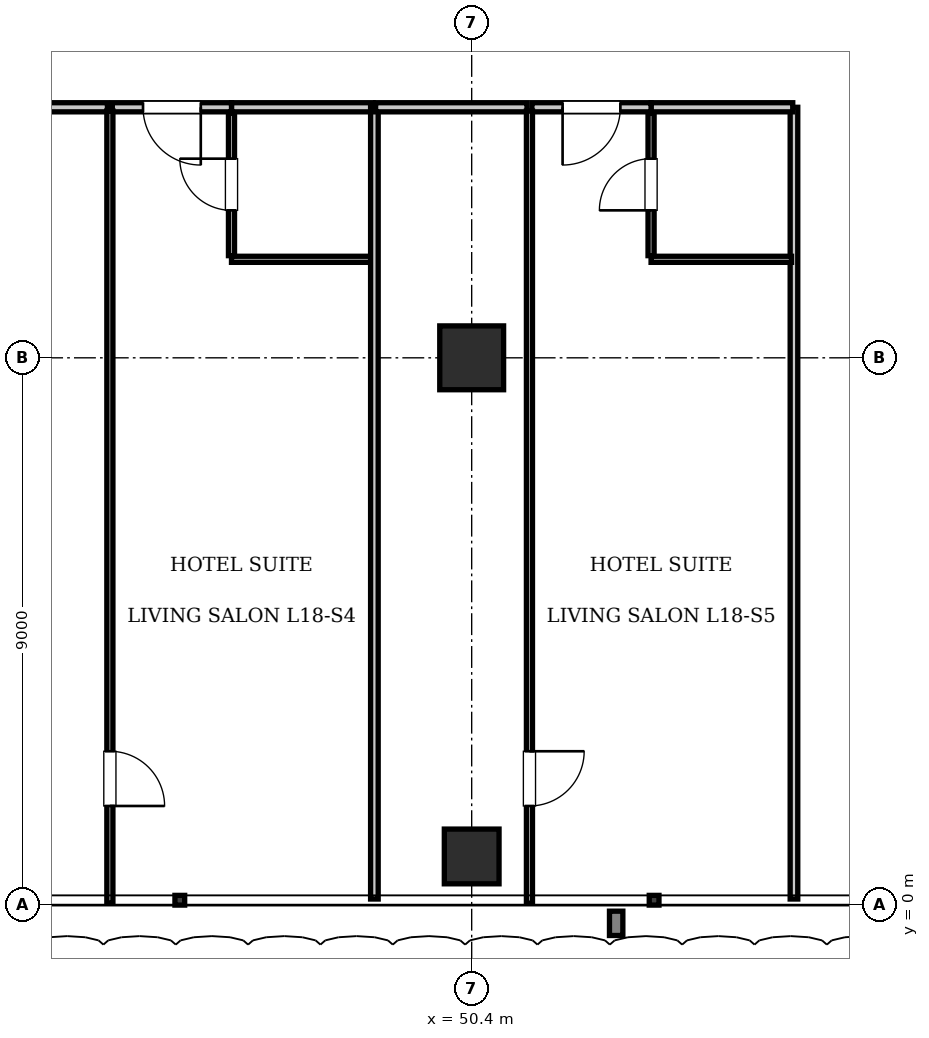
"""IFC4 building model, lengths in metres.
Left out: names, types, materials, properties, quantities, classifications, styles, units other than length and angle.
Written with IfcOpenShell. Run it as: python <this file> out.ifc"""

import sys

from ifc_helpers import new_model, si_unit, direction, frame, frame_2d, origin, origin_2d, place, context, subcontext, project, spatial, rectangle, extrude, element, fill, save


model = new_model("IFC4")
c1 = context("Model", 3, precision=1e-05, world=origin(), true_north=direction((0.0, 1.0)))
c2 = subcontext(c1, "Body", "Model", "MODEL_VIEW")
j1 = project(units=[si_unit("LENGTHUNIT", "METRE"), si_unit("PLANEANGLEUNIT", "RADIAN")], contexts=[c1])
p1 = place(None, origin())
s1 = spatial("IfcSite", under=j1, at=p1, CompositionType="ELEMENT")
p2 = place(p1, origin())
s2 = spatial("IfcBuilding", under=s1, at=p2, CompositionType="ELEMENT")
p3 = place(p2, frame((0.0, 0.0, 77.0)))
s3 = spatial("IfcBuildingStorey", under=s2, at=p3, CompositionType="ELEMENT", Elevation=77.0)
p4 = place(p3, frame((50.4, 9.0, 0.0), z_axis=(0.0, 0.0, 1.0), x_axis=(1.0, 0.0, 0.0)))
e1 = element("IfcColumn", 1, at=p4, inside=s3, PredefinedType="COLUMN", context=c2, shape_type="SweptSolid", body=[
    extrude(rectangle(XDim=1.05, YDim=1.05, at=origin_2d()), origin(), (0.0, 0.0, 1.0), 3.85),
])
p5 = place(p3, frame((50.4, 0.8, 0.0), z_axis=(0.0, 0.0, 1.0), x_axis=(1.0, 0.0, 0.0)))
e2 = element("IfcColumn", 2, at=p5, inside=s3, PredefinedType="COLUMN", context=c2, shape_type="SweptSolid", body=[
    extrude(rectangle(XDim=0.9, YDim=0.9, at=origin_2d()), origin(), (0.0, 0.0, 1.0), 3.85),
])
p6 = place(p3, frame((55.7, 0.1, 0.0), z_axis=(0.0, 0.0, 1.0), x_axis=(0.0, 1.0, 0.0)))
e3 = element("IfcWall", 3, at=p6, inside=s3, PredefinedType="PARTITIONING", context=c2, shape_type="SweptSolid", body=[
    extrude(rectangle(XDim=13.02, YDim=0.125, at=frame_2d((6.51, 0.0))), origin(), (0.0, 0.0, 1.0), 3.61),
])
p7 = place(p3, frame((46.45, 13.12, 0.0), z_axis=(0.0, 0.0, 1.0), x_axis=(1.0, 0.0, 0.0)))
e4 = element("IfcWall", 4, at=p7, inside=s3, PredefinedType="PARTITIONING", context=c2, shape_type="SweptSolid", body=[
    extrude(rectangle(XDim=2.33, YDim=0.15, at=frame_2d((1.165, 0.0))), origin(), (0.0, 0.0, 1.0), 3.61),
])
p8 = place(p3, frame((46.45, 10.62, 0.0), z_axis=(0.0, 0.0, 1.0), x_axis=(1.0, 0.0, 0.0)))
e5 = element("IfcWall", 5, at=p8, inside=s3, PredefinedType="PARTITIONING", context=c2, shape_type="SweptSolid", body=[
    extrude(rectangle(XDim=2.31, YDim=0.1, at=frame_2d((1.155, 0.0))), origin(), (0.0, 0.0, 1.0), 3.61),
])
p9 = place(p3, frame((46.45, 10.68, 0.0), z_axis=(0.0, 0.0, 1.0), x_axis=(0.0, 1.0, 0.0)))
e6 = element("IfcWall", 6, at=p9, inside=s3, PredefinedType="PARTITIONING", context=c2, shape_type="SweptSolid", body=[
    extrude(rectangle(XDim=2.34, YDim=0.1, at=frame_2d((1.17, 0.0))), origin(), (0.0, 0.0, 1.0), 3.61),
])
p10 = place(p9, frame((0.745, 0.0, 0.0)))
e7 = element("IfcOpeningElement", 7, at=p10, cuts=e6, PredefinedType="OPENING", context=c2, shape_type="SweptSolid", body=[
    extrude(rectangle(XDim=0.85, YDim=2.1, at=frame_2d((0.425, 1.05))), frame((0.0, 0.06, 0.0), z_axis=(0.0, -1.0, 0.0), x_axis=(1.0, 0.0, 0.0)), (0.0, 0.0, 1.0), 0.12),
])
p11 = place(p3, frame((41.62, 13.12, 0.0), z_axis=(0.0, 0.0, 1.0), x_axis=(1.0, 0.0, 0.0)))
e8 = element("IfcWall", 8, at=p11, inside=s3, PredefinedType="PARTITIONING", context=c2, shape_type="SweptSolid", body=[
    extrude(rectangle(XDim=2.79, YDim=0.15, at=frame_2d((1.395, 0.0))), origin(), (0.0, 0.0, 1.0), 3.61),
])
p12 = place(p3, frame((44.49, 13.12, 0.0), z_axis=(0.0, 0.0, 1.0), x_axis=(1.0, 0.0, 0.0)))
e9 = element("IfcWall", 9, at=p12, inside=s3, PredefinedType="PARTITIONING", context=c2, shape_type="SweptSolid", body=[
    extrude(rectangle(XDim=1.96, YDim=0.15, at=frame_2d((0.98, 0.0))), origin(), (0.0, 0.0, 1.0), 3.61),
])
p13 = place(p12, frame((0.505, 0.0, 0.0)))
e10 = element("IfcOpeningElement", 10, at=p13, cuts=e9, PredefinedType="OPENING", context=c2, shape_type="SweptSolid", body=[
    extrude(rectangle(XDim=0.95, YDim=2.15, at=frame_2d((0.475, 1.075))), frame((0.0, 0.085, 0.0), z_axis=(0.0, -1.0, 0.0), x_axis=(1.0, 0.0, 0.0)), (0.0, 0.0, 1.0), 0.17),
])
p14 = place(p3, frame((44.45, 0.03, 0.0), z_axis=(0.0, 0.0, 1.0), x_axis=(0.0, 1.0, 0.0)))
e11 = element("IfcWall", 11, at=p14, inside=s3, PredefinedType="PARTITIONING", context=c2, shape_type="SweptSolid", body=[
    extrude(rectangle(XDim=13.03, YDim=0.1, at=frame_2d((6.515, 0.0))), origin(), (0.0, 0.0, 1.0), 3.61),
])
p15 = place(p14, frame((1.6, 0.0, 0.0)))
e12 = element("IfcOpeningElement", 12, at=p15, cuts=e11, PredefinedType="OPENING", context=c2, shape_type="SweptSolid", body=[
    extrude(rectangle(XDim=0.9, YDim=2.1, at=frame_2d((0.45, 1.05))), frame((0.0, 0.06, 0.0), z_axis=(0.0, -1.0, 0.0), x_axis=(1.0, 0.0, 0.0)), (0.0, 0.0, 1.0), 0.12),
])
p16 = place(p3, frame((48.8, 0.1, 0.0), z_axis=(0.0, 0.0, 1.0), x_axis=(0.0, 1.0, 0.0)))
e13 = element("IfcWall", 13, at=p16, inside=s3, PredefinedType="PARTITIONING", context=c2, shape_type="SweptSolid", body=[
    extrude(rectangle(XDim=13.02, YDim=0.125, at=frame_2d((6.51, 0.0))), origin(), (0.0, 0.0, 1.0), 3.61),
])
p17 = place(p3, frame((53.35, 13.12, 0.0), z_axis=(0.0, 0.0, 1.0), x_axis=(1.0, 0.0, 0.0)))
e14 = element("IfcWall", 14, at=p17, inside=s3, PredefinedType="PARTITIONING", context=c2, shape_type="SweptSolid", body=[
    extrude(rectangle(XDim=2.33, YDim=0.15, at=frame_2d((1.165, 0.0))), origin(), (0.0, 0.0, 1.0), 3.61),
])
p18 = place(p3, frame((53.35, 10.62, 0.0), z_axis=(0.0, 0.0, 1.0), x_axis=(1.0, 0.0, 0.0)))
e15 = element("IfcWall", 15, at=p18, inside=s3, PredefinedType="PARTITIONING", context=c2, shape_type="SweptSolid", body=[
    extrude(rectangle(XDim=2.31, YDim=0.1, at=frame_2d((1.155, 0.0))), origin(), (0.0, 0.0, 1.0), 3.61),
])
p19 = place(p3, frame((53.35, 10.68, 0.0), z_axis=(0.0, 0.0, 1.0), x_axis=(0.0, 1.0, 0.0)))
e16 = element("IfcWall", 16, at=p19, inside=s3, PredefinedType="PARTITIONING", context=c2, shape_type="SweptSolid", body=[
    extrude(rectangle(XDim=2.34, YDim=0.1, at=frame_2d((1.17, 0.0))), origin(), (0.0, 0.0, 1.0), 3.61),
])
p20 = place(p19, frame((0.745, 0.0, 0.0)))
e17 = element("IfcOpeningElement", 17, at=p20, cuts=e16, PredefinedType="OPENING", context=c2, shape_type="SweptSolid", body=[
    extrude(rectangle(XDim=0.85, YDim=2.1, at=frame_2d((0.425, 1.05))), frame((0.0, 0.06, 0.0), z_axis=(0.0, -1.0, 0.0), x_axis=(1.0, 0.0, 0.0)), (0.0, 0.0, 1.0), 0.12),
])
p21 = place(p3, frame((48.82, 13.12, 0.0), z_axis=(0.0, 0.0, 1.0), x_axis=(1.0, 0.0, 0.0)))
e18 = element("IfcWall", 18, at=p21, inside=s3, PredefinedType="PARTITIONING", context=c2, shape_type="SweptSolid", body=[
    extrude(rectangle(XDim=2.49, YDim=0.15, at=frame_2d((1.245, 0.0))), origin(), (0.0, 0.0, 1.0), 3.61),
])
p22 = place(p3, frame((51.39, 13.12, 0.0), z_axis=(0.0, 0.0, 1.0), x_axis=(1.0, 0.0, 0.0)))
e19 = element("IfcWall", 19, at=p22, inside=s3, PredefinedType="PARTITIONING", context=c2, shape_type="SweptSolid", body=[
    extrude(rectangle(XDim=1.96, YDim=0.15, at=frame_2d((0.98, 0.0))), origin(), (0.0, 0.0, 1.0), 3.61),
])
p23 = place(p22, frame((0.505, 0.0, 0.0)))
e20 = element("IfcOpeningElement", 20, at=p23, cuts=e19, PredefinedType="OPENING", context=c2, shape_type="SweptSolid", body=[
    extrude(rectangle(XDim=0.95, YDim=2.15, at=frame_2d((0.475, 1.075))), frame((0.0, 0.085, 0.0), z_axis=(0.0, -1.0, 0.0), x_axis=(1.0, 0.0, 0.0)), (0.0, 0.0, 1.0), 0.17),
])
p24 = place(p3, frame((51.35, 0.03, 0.0), z_axis=(0.0, 0.0, 1.0), x_axis=(0.0, 1.0, 0.0)))
e21 = element("IfcWall", 21, at=p24, inside=s3, PredefinedType="PARTITIONING", context=c2, shape_type="SweptSolid", body=[
    extrude(rectangle(XDim=13.03, YDim=0.1, at=frame_2d((6.515, 0.0))), origin(), (0.0, 0.0, 1.0), 3.61),
])
p25 = place(p24, frame((1.6, 0.0, 0.0)))
e22 = element("IfcOpeningElement", 22, at=p25, cuts=e21, PredefinedType="OPENING", context=c2, shape_type="SweptSolid", body=[
    extrude(rectangle(XDim=0.9, YDim=2.1, at=frame_2d((0.45, 1.05))), frame((0.0, 0.06, 0.0), z_axis=(0.0, -1.0, 0.0), x_axis=(1.0, 0.0, 0.0)), (0.0, 0.0, 1.0), 0.12),
])
p26 = place(p10, origin())
e23 = element("IfcDoor", 23, at=p26, inside=s3, OperationType="SINGLE_SWING_RIGHT", PredefinedType="DOOR", context=c2, shape_type="SweptSolid", body=[
    extrude(rectangle(XDim=0.85, YDim=2.1, at=frame_2d((0.425, 1.05))), frame((0.0, 0.025, 0.0), z_axis=(0.0, -1.0, 0.0), x_axis=(1.0, 0.0, 0.0)), (0.0, 0.0, 1.0), 0.05),
])
fill(e7, e23)
p27 = place(p13, frame((0.95, 0.0, 0.0), z_axis=(0.0, 0.0, 1.0), x_axis=(-1.0, 0.0, 0.0)))
e24 = element("IfcDoor", 24, at=p27, inside=s3, OperationType="SINGLE_SWING_LEFT", PredefinedType="DOOR", context=c2, shape_type="SweptSolid", body=[
    extrude(rectangle(XDim=0.95, YDim=2.15, at=frame_2d((0.475, 1.075))), frame((0.0, 0.025, 0.0), z_axis=(0.0, -1.0, 0.0), x_axis=(1.0, 0.0, 0.0)), (0.0, 0.0, 1.0), 0.05),
])
fill(e10, e24)
p28 = place(p15, frame((0.9, 0.0, 0.0), z_axis=(0.0, 0.0, 1.0), x_axis=(-1.0, 0.0, 0.0)))
e25 = element("IfcDoor", 25, at=p28, inside=s3, OperationType="SINGLE_SWING_RIGHT", PredefinedType="DOOR", context=c2, shape_type="SweptSolid", body=[
    extrude(rectangle(XDim=0.9, YDim=2.1, at=frame_2d((0.45, 1.05))), frame((0.0, 0.025, 0.0), z_axis=(0.0, -1.0, 0.0), x_axis=(1.0, 0.0, 0.0)), (0.0, 0.0, 1.0), 0.05),
])
fill(e12, e25)
p29 = place(p20, origin())
e26 = element("IfcDoor", 26, at=p29, inside=s3, OperationType="SINGLE_SWING_LEFT", PredefinedType="DOOR", context=c2, shape_type="SweptSolid", body=[
    extrude(rectangle(XDim=0.85, YDim=2.1, at=frame_2d((0.425, 1.05))), frame((0.0, 0.025, 0.0), z_axis=(0.0, -1.0, 0.0), x_axis=(1.0, 0.0, 0.0)), (0.0, 0.0, 1.0), 0.05),
])
fill(e17, e26)
p30 = place(p23, frame((0.95, 0.0, 0.0), z_axis=(0.0, 0.0, 1.0), x_axis=(-1.0, 0.0, 0.0)))
e27 = element("IfcDoor", 27, at=p30, inside=s3, OperationType="SINGLE_SWING_RIGHT", PredefinedType="DOOR", context=c2, shape_type="SweptSolid", body=[
    extrude(rectangle(XDim=0.95, YDim=2.15, at=frame_2d((0.475, 1.075))), frame((0.0, 0.025, 0.0), z_axis=(0.0, -1.0, 0.0), x_axis=(1.0, 0.0, 0.0)), (0.0, 0.0, 1.0), 0.05),
])
fill(e20, e27)
p31 = place(p25, frame((0.9, 0.0, 0.0), z_axis=(0.0, 0.0, 1.0), x_axis=(-1.0, 0.0, 0.0)))
e28 = element("IfcDoor", 28, at=p31, inside=s3, OperationType="SINGLE_SWING_LEFT", PredefinedType="DOOR", context=c2, shape_type="SweptSolid", body=[
    extrude(rectangle(XDim=0.9, YDim=2.1, at=frame_2d((0.45, 1.05))), frame((0.0, 0.025, 0.0), z_axis=(0.0, -1.0, 0.0), x_axis=(1.0, 0.0, 0.0)), (0.0, 0.0, 1.0), 0.05),
])
fill(e22, e28)
save(model, sys.argv[1])
